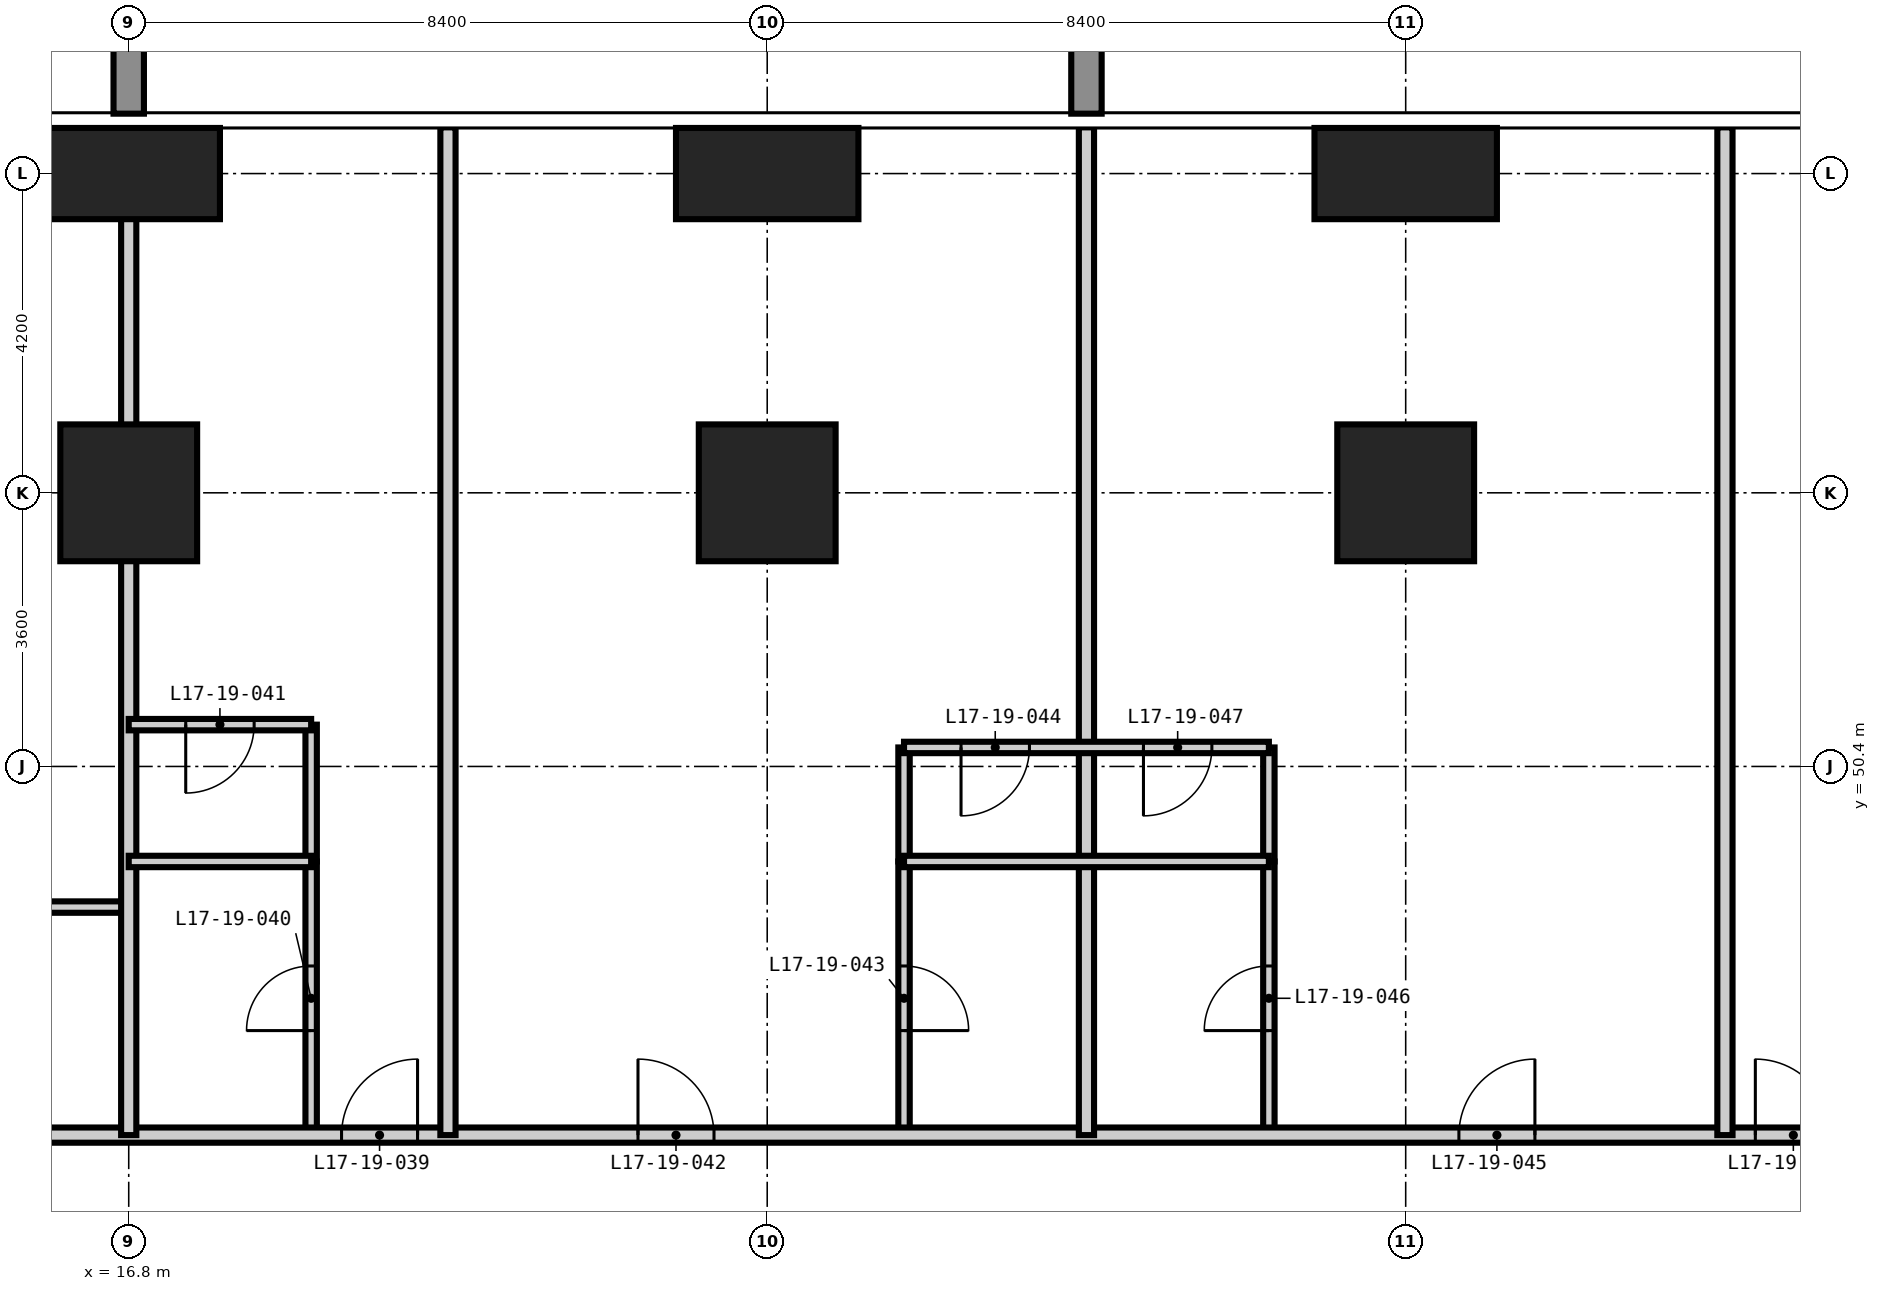
"""IFC4 building model, lengths in metres.
Left out: names, types, materials, properties, quantities, classifications, styles, units other than length and angle.
Written with IfcOpenShell. Run it as: python <this file> out.ifc"""

import sys

from ifc_helpers import new_model, si_unit, direction, frame, frame_2d, origin, origin_2d, place, context, subcontext, project, spatial, rectangle, extrude, element, fill, save


model = new_model("IFC4")
c1 = context("Model", 3, precision=1e-05, world=origin(), true_north=direction((0.0, 1.0)))
c2 = subcontext(c1, "Body", "Model", "MODEL_VIEW")
j1 = project(units=[si_unit("LENGTHUNIT", "METRE"), si_unit("PLANEANGLEUNIT", "RADIAN")], contexts=[c1])
p1 = place(None, origin())
s1 = spatial("IfcSite", under=j1, at=p1, CompositionType="ELEMENT")
p2 = place(p1, origin())
s2 = spatial("IfcBuilding", under=s1, at=p2, CompositionType="ELEMENT")
p3 = place(p2, frame((0.0, 0.0, 70.2)))
s3 = spatial("IfcBuildingStorey", under=s2, at=p3, CompositionType="ELEMENT", Elevation=70.2)
p4 = place(p3, frame((16.8, 54.0, -0.35), z_axis=(0.0, 0.0, 1.0), x_axis=(1.0, 0.0, 0.0)))
e1 = element("IfcColumn", 1, at=p4, inside=s3, PredefinedType="COLUMN", context=c2, shape_type="SweptSolid", body=[
    extrude(rectangle(XDim=1.8, YDim=1.8, at=origin_2d()), origin(), (0.0, 0.0, 1.0), 3.6),
])
p5 = place(p3, frame((16.8, 58.2, -0.35), z_axis=(0.0, 0.0, 1.0), x_axis=(1.0, 0.0, 0.0)))
e2 = element("IfcColumn", 2, at=p5, inside=s3, PredefinedType="COLUMN", context=c2, shape_type="SweptSolid", body=[
    extrude(rectangle(XDim=2.4, YDim=1.2, at=origin_2d()), origin(), (0.0, 0.0, 1.0), 3.6),
])
p6 = place(p3, frame((25.2, 54.0, -0.35), z_axis=(0.0, 0.0, 1.0), x_axis=(1.0, 0.0, 0.0)))
e3 = element("IfcColumn", 3, at=p6, inside=s3, PredefinedType="COLUMN", context=c2, shape_type="SweptSolid", body=[
    extrude(rectangle(XDim=1.8, YDim=1.8, at=origin_2d()), origin(), (0.0, 0.0, 1.0), 3.6),
])
p7 = place(p3, frame((25.2, 58.2, -0.35), z_axis=(0.0, 0.0, 1.0), x_axis=(1.0, 0.0, 0.0)))
e4 = element("IfcColumn", 4, at=p7, inside=s3, PredefinedType="COLUMN", context=c2, shape_type="SweptSolid", body=[
    extrude(rectangle(XDim=2.4, YDim=1.2, at=origin_2d()), origin(), (0.0, 0.0, 1.0), 3.6),
])
p8 = place(p3, frame((33.6, 54.0, -0.35), z_axis=(0.0, 0.0, 1.0), x_axis=(1.0, 0.0, 0.0)))
e5 = element("IfcColumn", 5, at=p8, inside=s3, PredefinedType="COLUMN", context=c2, shape_type="SweptSolid", body=[
    extrude(rectangle(XDim=1.8, YDim=1.8, at=origin_2d()), origin(), (0.0, 0.0, 1.0), 3.6),
])
p9 = place(p3, frame((33.6, 58.2, -0.35), z_axis=(0.0, 0.0, 1.0), x_axis=(1.0, 0.0, 0.0)))
e6 = element("IfcColumn", 6, at=p9, inside=s3, PredefinedType="COLUMN", context=c2, shape_type="SweptSolid", body=[
    extrude(rectangle(XDim=2.4, YDim=1.2, at=origin_2d()), origin(), (0.0, 0.0, 1.0), 3.6),
])
p10 = place(p3, frame((19.2, 45.55, 0.0), z_axis=(0.0, 0.0, 1.0), x_axis=(0.0, 1.0, 0.0)))
e7 = element("IfcWall", 7, at=p10, inside=s3, PredefinedType="PARTITIONING", context=c2, shape_type="SweptSolid", body=[
    extrude(rectangle(XDim=3.6, YDim=0.15, at=frame_2d((1.8, 0.0))), origin(), (0.0, 0.0, 1.0), 3.25),
])
p11 = place(p10, frame((1.375, 0.0, 0.0)))
e8 = element("IfcOpeningElement", 8, at=p11, cuts=e7, PredefinedType="OPENING", context=c2, shape_type="SweptSolid", body=[
    extrude(rectangle(XDim=0.85, YDim=2.1, at=frame_2d((0.425, 1.05))), frame((0.0, 0.085, 0.0), z_axis=(0.0, -1.0, 0.0), x_axis=(1.0, 0.0, 0.0)), (0.0, 0.0, 1.0), 0.17),
])
p12 = place(p3, frame((27.0, 45.55, 0.0), z_axis=(0.0, 0.0, 1.0), x_axis=(0.0, 1.0, 0.0)))
e9 = element("IfcWall", 9, at=p12, inside=s3, PredefinedType="PARTITIONING", context=c2, shape_type="SweptSolid", body=[
    extrude(rectangle(XDim=3.6, YDim=0.15, at=frame_2d((1.8, 0.0))), origin(), (0.0, 0.0, 1.0), 3.25),
])
p13 = place(p12, frame((1.375, 0.0, 0.0)))
e10 = element("IfcOpeningElement", 10, at=p13, cuts=e9, PredefinedType="OPENING", context=c2, shape_type="SweptSolid", body=[
    extrude(rectangle(XDim=0.85, YDim=2.1, at=frame_2d((0.425, 1.05))), frame((0.0, 0.085, 0.0), z_axis=(0.0, -1.0, 0.0), x_axis=(1.0, 0.0, 0.0)), (0.0, 0.0, 1.0), 0.17),
])
p14 = place(p3, frame((31.8, 45.55, 0.0), z_axis=(0.0, 0.0, 1.0), x_axis=(0.0, 1.0, 0.0)))
e11 = element("IfcWall", 11, at=p14, inside=s3, PredefinedType="PARTITIONING", context=c2, shape_type="SweptSolid", body=[
    extrude(rectangle(XDim=3.6, YDim=0.15, at=frame_2d((1.8, 0.0))), origin(), (0.0, 0.0, 1.0), 3.25),
])
p15 = place(p14, frame((1.375, 0.0, 0.0)))
e12 = element("IfcOpeningElement", 12, at=p15, cuts=e11, PredefinedType="OPENING", context=c2, shape_type="SweptSolid", body=[
    extrude(rectangle(XDim=0.85, YDim=2.1, at=frame_2d((0.425, 1.05))), frame((0.0, 0.085, 0.0), z_axis=(0.0, -1.0, 0.0), x_axis=(1.0, 0.0, 0.0)), (0.0, 0.0, 1.0), 0.17),
])
p16 = place(p3, frame((12.65, 48.55, 0.0), z_axis=(0.0, 0.0, 1.0), x_axis=(1.0, 0.0, 0.0)))
e13 = element("IfcWall", 13, at=p16, inside=s3, PredefinedType="PARTITIONING", context=c2, shape_type="SweptSolid", body=[
    extrude(rectangle(XDim=4.15, YDim=0.15, at=frame_2d((2.075, 0.0))), origin(), (0.0, 0.0, 1.0), 3.25),
])
p17 = place(p16, frame((1.65, 0.0, 0.0)))
e14 = element("IfcOpeningElement", 14, at=p17, cuts=e13, PredefinedType="OPENING", context=c2, shape_type="SweptSolid", body=[
    extrude(rectangle(XDim=0.85, YDim=2.1, at=frame_2d((0.425, 1.05))), frame((0.0, 0.085, 0.0), z_axis=(0.0, -1.0, 0.0), x_axis=(1.0, 0.0, 0.0)), (0.0, 0.0, 1.0), 0.17),
])
p18 = place(p3, frame((12.65, 45.55, 0.0), z_axis=(0.0, 0.0, 1.0), x_axis=(1.0, 0.0, 0.0)))
e15 = element("IfcWall", 15, at=p18, inside=s3, PredefinedType="PARTITIONING", context=c2, shape_type="SweptSolid", body=[
    extrude(rectangle(XDim=32.3, YDim=0.2, at=frame_2d((16.15, 0.0))), origin(), (0.0, 0.0, 1.0), 3.25),
])
p19 = place(p18, frame((6.95, 0.0, 0.0)))
e16 = element("IfcOpeningElement", 16, at=p19, cuts=e15, PredefinedType="OPENING", context=c2, shape_type="SweptSolid", body=[
    extrude(rectangle(XDim=1.0, YDim=2.2, at=frame_2d((0.5, 1.1))), frame((0.0, 0.11, 0.0), z_axis=(0.0, -1.0, 0.0), x_axis=(1.0, 0.0, 0.0)), (0.0, 0.0, 1.0), 0.22),
])
p20 = place(p18, frame((10.85, 0.0, 0.0)))
e17 = element("IfcOpeningElement", 17, at=p20, cuts=e15, PredefinedType="OPENING", context=c2, shape_type="SweptSolid", body=[
    extrude(rectangle(XDim=1.0, YDim=2.2, at=frame_2d((0.5, 1.1))), frame((0.0, 0.11, 0.0), z_axis=(0.0, -1.0, 0.0), x_axis=(1.0, 0.0, 0.0)), (0.0, 0.0, 1.0), 0.22),
])
p21 = place(p18, frame((21.65, 0.0, 0.0)))
e18 = element("IfcOpeningElement", 18, at=p21, cuts=e15, PredefinedType="OPENING", context=c2, shape_type="SweptSolid", body=[
    extrude(rectangle(XDim=1.0, YDim=2.2, at=frame_2d((0.5, 1.1))), frame((0.0, 0.11, 0.0), z_axis=(0.0, -1.0, 0.0), x_axis=(1.0, 0.0, 0.0)), (0.0, 0.0, 1.0), 0.22),
])
p22 = place(p18, frame((25.55, 0.0, 0.0)))
e19 = element("IfcOpeningElement", 19, at=p22, cuts=e15, PredefinedType="OPENING", context=c2, shape_type="SweptSolid", body=[
    extrude(rectangle(XDim=1.0, YDim=2.2, at=frame_2d((0.5, 1.1))), frame((0.0, 0.11, 0.0), z_axis=(0.0, -1.0, 0.0), x_axis=(1.0, 0.0, 0.0)), (0.0, 0.0, 1.0), 0.22),
])
for number, where, z_axis, x_axis in (
    (20, (16.8, 45.55, 0.0), (0.0, 0.0, 1.0), (0.0, 1.0, 0.0)),
    (21, (21.0, 45.55, 0.0), (0.0, 0.0, 1.0), (0.0, 1.0, 0.0)),
    (22, (29.4, 45.55, 0.0), (0.0, 0.0, 1.0), (0.0, 1.0, 0.0)),
    (23, (37.8, 45.55, 0.0), (0.0, 0.0, 1.0), (0.0, 1.0, 0.0)),
):
    element("IfcWall", number, at=place(p3, frame(where, z_axis=z_axis, x_axis=x_axis)), inside=s3, PredefinedType="PARTITIONING", context=c2, shape_type="SweptSolid", body=[
        extrude(rectangle(XDim=13.258, YDim=0.2, at=frame_2d((6.629, 0.0))), origin(), (0.0, 0.0, 1.0), 3.25),
    ])
p23 = place(p3, frame((19.2, 49.15, 0.0), z_axis=(0.0, 0.0, 1.0), x_axis=(0.0, 1.0, 0.0)))
e24 = element("IfcWall", 24, at=p23, inside=s3, PredefinedType="PARTITIONING", context=c2, shape_type="SweptSolid", body=[
    extrude(rectangle(XDim=1.8, YDim=0.15, at=frame_2d((0.9, 0.0))), origin(), (0.0, 0.0, 1.0), 3.25),
])
for number, where, z_axis, x_axis in (
    (25, (27.0, 49.15, 0.0), (0.0, 0.0, 1.0), (0.0, 1.0, 0.0)),
    (26, (31.8, 49.15, 0.0), (0.0, 0.0, 1.0), (0.0, 1.0, 0.0)),
):
    element("IfcWall", number, at=place(p3, frame(where, z_axis=z_axis, x_axis=x_axis)), inside=s3, PredefinedType="PARTITIONING", context=c2, shape_type="SweptSolid", body=[
        extrude(rectangle(XDim=1.5, YDim=0.15, at=frame_2d((0.75, 0.0))), origin(), (0.0, 0.0, 1.0), 3.25),
    ])
p24 = place(p3, frame((16.8, 49.15, 0.0), z_axis=(0.0, 0.0, 1.0), x_axis=(1.0, 0.0, 0.0)))
e27 = element("IfcWall", 27, at=p24, inside=s3, PredefinedType="PARTITIONING", context=c2, shape_type="SweptSolid", body=[
    extrude(rectangle(XDim=2.4, YDim=0.15, at=frame_2d((1.2, 0.0))), origin(), (0.0, 0.0, 1.0), 3.25),
])
p25 = place(p3, frame((27.0, 49.15, 0.0), z_axis=(0.0, 0.0, 1.0), x_axis=(1.0, 0.0, 0.0)))
e28 = element("IfcWall", 28, at=p25, inside=s3, PredefinedType="PARTITIONING", context=c2, shape_type="SweptSolid", body=[
    extrude(rectangle(XDim=4.8, YDim=0.15, at=frame_2d((2.4, 0.0))), origin(), (0.0, 0.0, 1.0), 3.25),
])
p26 = place(p3, frame((27.0, 50.65, 0.0), z_axis=(0.0, 0.0, 1.0), x_axis=(1.0, 0.0, 0.0)))
e29 = element("IfcWall", 29, at=p26, inside=s3, PredefinedType="PARTITIONING", context=c2, shape_type="SweptSolid", body=[
    extrude(rectangle(XDim=4.8, YDim=0.15, at=frame_2d((2.4, 0.0))), origin(), (0.0, 0.0, 1.0), 3.25),
])
p27 = place(p26, frame((0.75, 0.0, 0.0)))
e30 = element("IfcOpeningElement", 30, at=p27, cuts=e29, PredefinedType="OPENING", context=c2, shape_type="SweptSolid", body=[
    extrude(rectangle(XDim=0.9, YDim=2.1, at=frame_2d((0.45, 1.05))), frame((0.0, 0.085, 0.0), z_axis=(0.0, -1.0, 0.0), x_axis=(1.0, 0.0, 0.0)), (0.0, 0.0, 1.0), 0.17),
])
p28 = place(p26, frame((3.15, 0.0, 0.0)))
e31 = element("IfcOpeningElement", 31, at=p28, cuts=e29, PredefinedType="OPENING", context=c2, shape_type="SweptSolid", body=[
    extrude(rectangle(XDim=0.9, YDim=2.1, at=frame_2d((0.45, 1.05))), frame((0.0, 0.085, 0.0), z_axis=(0.0, -1.0, 0.0), x_axis=(1.0, 0.0, 0.0)), (0.0, 0.0, 1.0), 0.17),
])
p29 = place(p3, frame((16.8, 50.95, 0.0), z_axis=(0.0, 0.0, 1.0), x_axis=(1.0, 0.0, 0.0)))
e32 = element("IfcWall", 32, at=p29, inside=s3, PredefinedType="PARTITIONING", context=c2, shape_type="SweptSolid", body=[
    extrude(rectangle(XDim=2.4, YDim=0.15, at=frame_2d((1.2, 0.0))), origin(), (0.0, 0.0, 1.0), 3.25),
])
p30 = place(p29, frame((0.75, 0.0, 0.0)))
e33 = element("IfcOpeningElement", 33, at=p30, cuts=e32, PredefinedType="OPENING", context=c2, shape_type="SweptSolid", body=[
    extrude(rectangle(XDim=0.9, YDim=2.1, at=frame_2d((0.45, 1.05))), frame((0.0, 0.085, 0.0), z_axis=(0.0, -1.0, 0.0), x_axis=(1.0, 0.0, 0.0)), (0.0, 0.0, 1.0), 0.17),
])
p31 = place(p19, origin())
e34 = element("IfcDoor", 34, at=p31, inside=s3, OperationType="SINGLE_SWING_RIGHT", PredefinedType="DOOR", context=c2, shape_type="SweptSolid", body=[
    extrude(rectangle(XDim=1.0, YDim=2.2, at=frame_2d((0.5, 1.1))), frame((0.0, 0.025, 0.0), z_axis=(0.0, -1.0, 0.0), x_axis=(1.0, 0.0, 0.0)), (0.0, 0.0, 1.0), 0.05),
])
fill(e16, e34)
p32 = place(p11, origin())
e35 = element("IfcDoor", 35, at=p32, inside=s3, OperationType="SINGLE_SWING_LEFT", PredefinedType="DOOR", context=c2, shape_type="SweptSolid", body=[
    extrude(rectangle(XDim=0.85, YDim=2.1, at=frame_2d((0.425, 1.05))), frame((0.0, 0.025, 0.0), z_axis=(0.0, -1.0, 0.0), x_axis=(1.0, 0.0, 0.0)), (0.0, 0.0, 1.0), 0.05),
])
fill(e8, e35)
p33 = place(p30, frame((0.9, 0.0, 0.0), z_axis=(0.0, 0.0, 1.0), x_axis=(-1.0, 0.0, 0.0)))
e36 = element("IfcDoor", 36, at=p33, inside=s3, OperationType="SINGLE_SWING_RIGHT", PredefinedType="DOOR", context=c2, shape_type="SweptSolid", body=[
    extrude(rectangle(XDim=0.9, YDim=2.1, at=frame_2d((0.45, 1.05))), frame((0.0, 0.025, 0.0), z_axis=(0.0, -1.0, 0.0), x_axis=(1.0, 0.0, 0.0)), (0.0, 0.0, 1.0), 0.05),
])
fill(e33, e36)
p34 = place(p20, origin())
e37 = element("IfcDoor", 37, at=p34, inside=s3, OperationType="SINGLE_SWING_LEFT", PredefinedType="DOOR", context=c2, shape_type="SweptSolid", body=[
    extrude(rectangle(XDim=1.0, YDim=2.2, at=frame_2d((0.5, 1.1))), frame((0.0, 0.025, 0.0), z_axis=(0.0, -1.0, 0.0), x_axis=(1.0, 0.0, 0.0)), (0.0, 0.0, 1.0), 0.05),
])
fill(e17, e37)
p35 = place(p13, frame((0.85, 0.0, 0.0), z_axis=(0.0, 0.0, 1.0), x_axis=(-1.0, 0.0, 0.0)))
e38 = element("IfcDoor", 38, at=p35, inside=s3, OperationType="SINGLE_SWING_RIGHT", PredefinedType="DOOR", context=c2, shape_type="SweptSolid", body=[
    extrude(rectangle(XDim=0.85, YDim=2.1, at=frame_2d((0.425, 1.05))), frame((0.0, 0.025, 0.0), z_axis=(0.0, -1.0, 0.0), x_axis=(1.0, 0.0, 0.0)), (0.0, 0.0, 1.0), 0.05),
])
fill(e10, e38)
p36 = place(p27, frame((0.9, 0.0, 0.0), z_axis=(0.0, 0.0, 1.0), x_axis=(-1.0, 0.0, 0.0)))
e39 = element("IfcDoor", 39, at=p36, inside=s3, OperationType="SINGLE_SWING_RIGHT", PredefinedType="DOOR", context=c2, shape_type="SweptSolid", body=[
    extrude(rectangle(XDim=0.9, YDim=2.1, at=frame_2d((0.45, 1.05))), frame((0.0, 0.025, 0.0), z_axis=(0.0, -1.0, 0.0), x_axis=(1.0, 0.0, 0.0)), (0.0, 0.0, 1.0), 0.05),
])
fill(e30, e39)
p37 = place(p21, origin())
e40 = element("IfcDoor", 40, at=p37, inside=s3, OperationType="SINGLE_SWING_RIGHT", PredefinedType="DOOR", context=c2, shape_type="SweptSolid", body=[
    extrude(rectangle(XDim=1.0, YDim=2.2, at=frame_2d((0.5, 1.1))), frame((0.0, 0.025, 0.0), z_axis=(0.0, -1.0, 0.0), x_axis=(1.0, 0.0, 0.0)), (0.0, 0.0, 1.0), 0.05),
])
fill(e18, e40)
p38 = place(p15, origin())
e41 = element("IfcDoor", 41, at=p38, inside=s3, OperationType="SINGLE_SWING_LEFT", PredefinedType="DOOR", context=c2, shape_type="SweptSolid", body=[
    extrude(rectangle(XDim=0.85, YDim=2.1, at=frame_2d((0.425, 1.05))), frame((0.0, 0.025, 0.0), z_axis=(0.0, -1.0, 0.0), x_axis=(1.0, 0.0, 0.0)), (0.0, 0.0, 1.0), 0.05),
])
fill(e12, e41)
p39 = place(p28, frame((0.9, 0.0, 0.0), z_axis=(0.0, 0.0, 1.0), x_axis=(-1.0, 0.0, 0.0)))
e42 = element("IfcDoor", 42, at=p39, inside=s3, OperationType="SINGLE_SWING_RIGHT", PredefinedType="DOOR", context=c2, shape_type="SweptSolid", body=[
    extrude(rectangle(XDim=0.9, YDim=2.1, at=frame_2d((0.45, 1.05))), frame((0.0, 0.025, 0.0), z_axis=(0.0, -1.0, 0.0), x_axis=(1.0, 0.0, 0.0)), (0.0, 0.0, 1.0), 0.05),
])
fill(e31, e42)
p40 = place(p22, origin())
e43 = element("IfcDoor", 43, at=p40, inside=s3, OperationType="SINGLE_SWING_LEFT", PredefinedType="DOOR", context=c2, shape_type="SweptSolid", body=[
    extrude(rectangle(XDim=1.0, YDim=2.2, at=frame_2d((0.5, 1.1))), frame((0.0, 0.025, 0.0), z_axis=(0.0, -1.0, 0.0), x_axis=(1.0, 0.0, 0.0)), (0.0, 0.0, 1.0), 0.05),
])
fill(e19, e43)
save(model, sys.argv[1])
